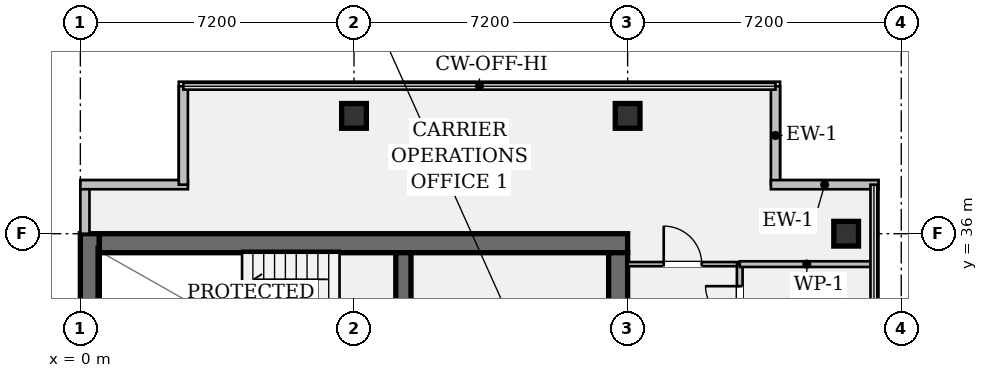
"""IFC4 building model, lengths in metres.
Left out: names, types, materials, properties, quantities, classifications, styles, units other than length and angle.
Written with IfcOpenShell. Run it as: python <this file> out.ifc"""

import sys

from ifc_helpers import new_model, si_unit, direction, frame, frame_2d, origin, origin_2d, place, context, subcontext, project, spatial, rectangle, hollow_rectangle, extrude, element, fill, save


model = new_model("IFC4")
c1 = context("Model", 3, precision=1e-05, world=origin(), true_north=direction((0.0, 1.0)))
c2 = subcontext(c1, "Body", "Model", "MODEL_VIEW")
j1 = project(units=[si_unit("LENGTHUNIT", "METRE"), si_unit("PLANEANGLEUNIT", "RADIAN")], contexts=[c1])
p1 = place(None, origin())
s1 = spatial("IfcSite", under=j1, at=p1, CompositionType="ELEMENT")
p2 = place(p1, origin())
s2 = spatial("IfcBuilding", under=s1, at=p2, CompositionType="ELEMENT")
p3 = place(p2, frame((0.0, 0.0, 269.15)))
s3 = spatial("IfcBuildingStorey", under=s2, at=p3, CompositionType="ELEMENT", Elevation=269.15)
p4 = place(p3, frame((0.25, 7.2, 0.0), z_axis=(0.0, 0.0, 1.0), x_axis=(0.0, 1.0, 0.0)))
e1 = element("IfcWall", 1, at=p4, inside=s3, PredefinedType="SHEAR", context=c2, shape_type="SweptSolid", body=[
    extrude(rectangle(XDim=28.8, YDim=0.5, at=frame_2d((14.4, 0.0))), origin(), (0.0, 0.0, 1.0), 3.24),
])
p5 = place(p3, frame((0.5, 35.75, 0.0), z_axis=(0.0, 0.0, 1.0), x_axis=(1.0, 0.0, 0.0)))
e2 = element("IfcWall", 2, at=p5, inside=s3, PredefinedType="SHEAR", context=c2, shape_type="SweptSolid", body=[
    extrude(rectangle(XDim=13.9, YDim=0.5, at=frame_2d((6.95, 0.0))), origin(), (0.0, 0.0, 1.0), 3.24),
])
p6 = place(p3, frame((14.15, 35.5, 0.0), z_axis=(0.0, 0.0, 1.0), x_axis=(0.0, -1.0, 0.0)))
e3 = element("IfcWall", 3, at=p6, inside=s3, PredefinedType="SHEAR", context=c2, shape_type="SweptSolid", body=[
    extrude(rectangle(XDim=27.8, YDim=0.5, at=frame_2d((13.9, 0.0))), origin(), (0.0, 0.0, 1.0), 3.24),
])
p7 = place(p6, frame((1.4, 0.0, 0.0)))
e4 = element("IfcOpeningElement", 4, at=p7, cuts=e3, PredefinedType="OPENING", context=c2, shape_type="SweptSolid", body=[
    extrude(rectangle(XDim=1.2, YDim=2.15, at=frame_2d((0.6, 1.075))), frame((0.0, 0.262, 0.0), z_axis=(0.0, -1.0, 0.0), x_axis=(1.0, 0.0, 0.0)), (0.0, 0.0, 1.0), 0.524),
])
p8 = place(p6, frame((25.35, 0.0, 0.0)))
e5 = element("IfcOpeningElement", 5, at=p8, cuts=e3, PredefinedType="OPENING", context=c2, shape_type="SweptSolid", body=[
    extrude(rectangle(XDim=1.2, YDim=2.15, at=frame_2d((0.6, 1.075))), frame((0.0, 0.262, 0.0), z_axis=(0.0, -1.0, 0.0), x_axis=(1.0, 0.0, 0.0)), (0.0, 0.0, 1.0), 0.524),
])
p9 = place(p6, frame((14.7, 0.0, 0.0)))
e6 = element("IfcOpeningElement", 6, at=p9, cuts=e3, PredefinedType="OPENING", context=c2, shape_type="SweptSolid", body=[
    extrude(rectangle(XDim=1.6, YDim=2.2, at=frame_2d((0.8, 1.1))), frame((0.0, 0.262, 0.0), z_axis=(0.0, -1.0, 0.0), x_axis=(1.0, 0.0, 0.0)), (0.0, 0.0, 1.0), 0.524),
])
p10 = place(p3, frame((8.5, 31.72, 0.0), z_axis=(0.0, 0.0, 1.0), x_axis=(0.0, 1.0, 0.0)))
e7 = element("IfcWall", 7, at=p10, inside=s3, PredefinedType="SHEAR", context=c2, shape_type="SweptSolid", body=[
    extrude(rectangle(XDim=3.78, YDim=0.4, at=frame_2d((1.89, 0.0))), origin(), (0.0, 0.0, 1.0), 3.24),
])
p11 = place(p10, frame((0.9, 0.0, 0.0)))
e8 = element("IfcOpeningElement", 8, at=p11, cuts=e7, PredefinedType="OPENING", context=c2, shape_type="SweptSolid", body=[
    extrude(rectangle(XDim=1.1, YDim=2.15, at=frame_2d((0.55, 1.075))), frame((0.0, 0.212, 0.0), z_axis=(0.0, -1.0, 0.0), x_axis=(1.0, 0.0, 0.0)), (0.0, 0.0, 1.0), 0.424),
])
for number, where, z_axis, x_axis in (
    (9, (7.2, 39.1, 0.0), (0.0, 0.0, 1.0), (1.0, 0.0, 0.0)),
    (10, (14.4, 39.1, 0.0), (0.0, 0.0, 1.0), (1.0, 0.0, 0.0)),
    (11, (20.15, 36.0, 0.0), (0.0, 0.0, 1.0), (1.0, 0.0, 0.0)),
):
    element("IfcColumn", number, at=place(p3, frame(where, z_axis=z_axis, x_axis=x_axis)), inside=s3, PredefinedType="COLUMN", context=c2, shape_type="SweptSolid", body=[
        extrude(hollow_rectangle(XDim=0.65, YDim=0.65, WallThickness=0.04, at=origin_2d()), origin(), (0.0, 0.0, 1.0), 3.24),
    ])
p12 = place(p3, frame((0.12, 36.0, 0.0), z_axis=(0.0, 0.0, 1.0), x_axis=(0.0, 1.0, 0.0)))
e12 = element("IfcWall", 12, at=p12, inside=s3, PredefinedType="STANDARD", context=c2, shape_type="SweptSolid", body=[
    extrude(rectangle(XDim=1.29, YDim=0.24, at=frame_2d((0.645, 0.0))), origin(), (0.0, 0.0, 1.0), 3.24),
])
p13 = place(p3, frame((0.0, 37.29, 0.0), z_axis=(0.0, 0.0, 1.0), x_axis=(1.0, 0.0, 0.0)))
e13 = element("IfcWall", 13, at=p13, inside=s3, PredefinedType="STANDARD", context=c2, shape_type="SweptSolid", body=[
    extrude(rectangle(XDim=2.83, YDim=0.24, at=frame_2d((1.415, 0.0))), origin(), (0.0, 0.0, 1.0), 3.24),
])
for number, where, z_axis, x_axis in (
    (14, (2.71, 37.29, 0.0), (0.0, 0.0, 1.0), (0.0, 1.0, 0.0)),
    (15, (18.29, 39.88, 0.0), (0.0, 0.0, 1.0), (0.0, -1.0, 0.0)),
):
    element("IfcWall", number, at=place(p3, frame(where, z_axis=z_axis, x_axis=x_axis)), inside=s3, PredefinedType="STANDARD", context=c2, shape_type="SweptSolid", body=[
        extrude(rectangle(XDim=2.59, YDim=0.24, at=frame_2d((1.295, 0.0))), origin(), (0.0, 0.0, 1.0), 3.24),
    ])
p14 = place(p3, frame((18.17, 37.29, 0.0), z_axis=(0.0, 0.0, 1.0), x_axis=(1.0, 0.0, 0.0)))
e16 = element("IfcWall", 16, at=p14, inside=s3, PredefinedType="STANDARD", context=c2, shape_type="SweptSolid", body=[
    extrude(rectangle(XDim=2.83, YDim=0.24, at=frame_2d((1.415, 0.0))), origin(), (0.0, 0.0, 1.0), 3.24),
])
p15 = place(p3, frame((14.4, 35.2, 0.0), z_axis=(0.0, 0.0, 1.0), x_axis=(1.0, 0.0, 0.0)))
e17 = element("IfcWall", 17, at=p15, inside=s3, PredefinedType="PARTITIONING", context=c2, shape_type="SweptSolid", body=[
    extrude(rectangle(XDim=2.95, YDim=0.11, at=frame_2d((1.475, 0.0))), origin(), (0.0, 0.0, 1.0), 2.808),
])
p16 = place(p15, frame((0.95, 0.0, 0.0)))
e18 = element("IfcOpeningElement", 18, at=p16, cuts=e17, PredefinedType="OPENING", context=c2, shape_type="SweptSolid", body=[
    extrude(rectangle(XDim=1.0, YDim=2.15, at=frame_2d((0.5, 1.075))), frame((0.0, 0.067, 0.0), z_axis=(0.0, -1.0, 0.0), x_axis=(1.0, 0.0, 0.0)), (0.0, 0.0, 1.0), 0.134),
])
p17 = place(p3, frame((17.35, 19.95, 0.0), z_axis=(0.0, 0.0, 1.0), x_axis=(0.0, 1.0, 0.0)))
e19 = element("IfcWall", 19, at=p17, inside=s3, PredefinedType="PARTITIONING", context=c2, shape_type="SweptSolid", body=[
    extrude(rectangle(XDim=15.25, YDim=0.15, at=frame_2d((7.625, 0.0))), origin(), (0.0, 0.0, 1.0), 2.676),
])
p18 = place(p17, frame((4.02, 0.0, 0.0)))
e20 = element("IfcOpeningElement", 20, at=p18, cuts=e19, PredefinedType="OPENING", context=c2, shape_type="SweptSolid", body=[
    extrude(rectangle(XDim=0.9, YDim=2.15, at=frame_2d((0.45, 1.075))), frame((0.0, 0.087, 0.0), z_axis=(0.0, -1.0, 0.0), x_axis=(1.0, 0.0, 0.0)), (0.0, 0.0, 1.0), 0.174),
])
p19 = place(p17, frame((7.27, 0.0, 0.0)))
e21 = element("IfcOpeningElement", 21, at=p19, cuts=e19, PredefinedType="OPENING", context=c2, shape_type="SweptSolid", body=[
    extrude(rectangle(XDim=0.9, YDim=2.15, at=frame_2d((0.45, 1.075))), frame((0.0, 0.087, 0.0), z_axis=(0.0, -1.0, 0.0), x_axis=(1.0, 0.0, 0.0)), (0.0, 0.0, 1.0), 0.174),
])
p20 = place(p17, frame((10.52, 0.0, 0.0)))
e22 = element("IfcOpeningElement", 22, at=p20, cuts=e19, PredefinedType="OPENING", context=c2, shape_type="SweptSolid", body=[
    extrude(rectangle(XDim=0.9, YDim=2.15, at=frame_2d((0.45, 1.075))), frame((0.0, 0.087, 0.0), z_axis=(0.0, -1.0, 0.0), x_axis=(1.0, 0.0, 0.0)), (0.0, 0.0, 1.0), 0.174),
])
p21 = place(p17, frame((13.77, 0.0, 0.0)))
e23 = element("IfcOpeningElement", 23, at=p21, cuts=e19, PredefinedType="OPENING", context=c2, shape_type="SweptSolid", body=[
    extrude(rectangle(XDim=0.9, YDim=2.15, at=frame_2d((0.45, 1.075))), frame((0.0, 0.087, 0.0), z_axis=(0.0, -1.0, 0.0), x_axis=(1.0, 0.0, 0.0)), (0.0, 0.0, 1.0), 0.174),
])
p22 = place(p3, frame((17.35, 35.2, 0.0), z_axis=(0.0, 0.0, 1.0), x_axis=(1.0, 0.0, 0.0)))
e24 = element("IfcWall", 24, at=p22, inside=s3, PredefinedType="PARTITIONING", context=c2, shape_type="SweptSolid", body=[
    extrude(rectangle(XDim=3.53, YDim=0.15, at=frame_2d((1.765, 0.0))), origin(), (0.0, 0.0, 1.0), 2.808),
])
p23 = place(p3, frame((20.9, 22.7, 0.0), z_axis=(0.0, 0.0, 1.0), x_axis=(0.0, 1.0, 0.0)))
e25 = element("IfcWall", 25, at=p23, inside=s3, PredefinedType="PARTITIONING", context=c2, shape_type="SweptSolid", body=[
    extrude(rectangle(XDim=12.5, YDim=0.11, at=frame_2d((6.25, 0.0))), origin(), (0.0, 0.0, 1.0), 3.24),
])
p24 = place(p16, origin())
e26 = element("IfcDoor", 26, at=p24, inside=s3, OperationType="SINGLE_SWING_LEFT", PredefinedType="DOOR", context=c2, shape_type="SweptSolid", body=[
    extrude(rectangle(XDim=1.0, YDim=2.15, at=frame_2d((0.5, 1.075))), frame((0.0, 0.025, 0.0), z_axis=(0.0, -1.0, 0.0), x_axis=(1.0, 0.0, 0.0)), (0.0, 0.0, 1.0), 0.05),
])
fill(e18, e26)
p25 = place(p21, origin())
e27 = element("IfcDoor", 27, at=p25, inside=s3, OperationType="SINGLE_SWING_RIGHT", PredefinedType="DOOR", context=c2, shape_type="SweptSolid", body=[
    extrude(rectangle(XDim=0.9, YDim=2.15, at=frame_2d((0.45, 1.075))), frame((0.0, 0.025, 0.0), z_axis=(0.0, -1.0, 0.0), x_axis=(1.0, 0.0, 0.0)), (0.0, 0.0, 1.0), 0.05),
])
fill(e23, e27)
save(model, sys.argv[1])
